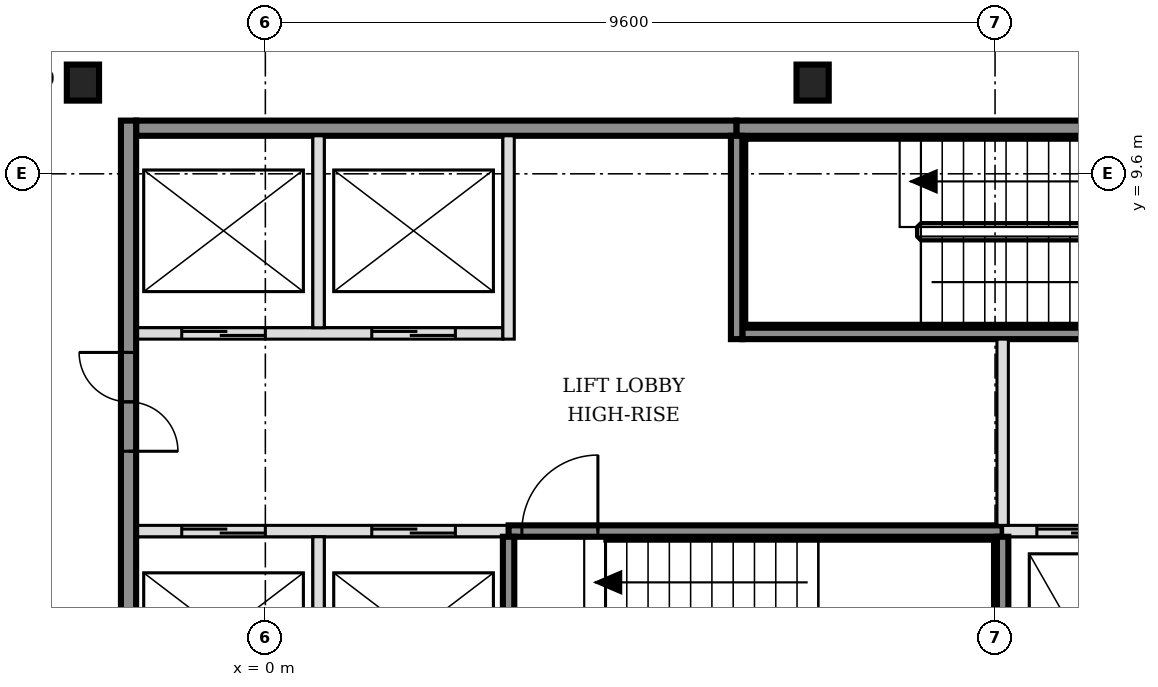
"""IFC4 building model, lengths in metres.
Left out: names, types, materials, properties, quantities, classifications, styles, units other than length and angle.
Written with IfcOpenShell. Run it as: python <this file> out.ifc"""

import sys

from ifc_helpers import new_model, si_unit, direction, frame, frame_2d, origin, origin_2d, place, context, subcontext, project, spatial, rectangle, i_section, extrude, element, fill, save


model = new_model("IFC4")
c1 = context("Model", 3, precision=1e-05, world=origin(), true_north=direction((0.0, 1.0)))
c2 = subcontext(c1, "Body", "Model", "MODEL_VIEW")
j1 = project(units=[si_unit("LENGTHUNIT", "METRE"), si_unit("PLANEANGLEUNIT", "RADIAN")], contexts=[c1])
p1 = place(None, origin())
s1 = spatial("IfcSite", under=j1, at=p1, CompositionType="ELEMENT")
p2 = place(p1, origin())
s2 = spatial("IfcBuilding", under=s1, at=p2, CompositionType="ELEMENT")
p3 = place(p2, frame((0.0, 0.0, 125.4)))
s3 = spatial("IfcBuildingStorey", under=s2, at=p3, CompositionType="ELEMENT", Elevation=125.4)
for number, where, z_axis, x_axis in (
    (1, (-2.4, 10.8, -0.15), (0.0, 0.0, 1.0), (1.0, 0.0, 0.0)),
    (2, (7.2, 10.8, -0.15), (0.0, 0.0, 1.0), (1.0, 0.0, 0.0)),
):
    element("IfcColumn", number, at=place(p3, frame(where, z_axis=z_axis, x_axis=x_axis)), inside=s3, PredefinedType="COLUMN", context=c2, shape_type="SweptSolid", body=[
        extrude(i_section(OverallWidth=0.424, OverallDepth=0.474, WebThickness=0.048, FlangeThickness=0.077, FilletRadius=0.015, at=origin_2d()), origin(), (0.0, 0.0, 1.0), 3.6),
    ])
p4 = place(p3, frame((-1.7, 4.9, 0.0), z_axis=(0.0, 0.0, 1.0), x_axis=(1.0, 0.0, 0.0)))
e3 = element("IfcWall", 3, at=p4, inside=s3, PredefinedType="SOLIDWALL", context=c2, shape_type="SweptSolid", body=[
    extrude(rectangle(XDim=4.9, YDim=0.15, at=frame_2d((2.45, 0.0))), origin(), (0.0, 0.0, 1.0), 3.45),
])
p5 = place(p4, frame((0.6, 0.0, 0.0)))
e4 = element("IfcOpeningElement", 4, at=p5, cuts=e3, PredefinedType="OPENING", context=c2, shape_type="SweptSolid", body=[
    extrude(rectangle(XDim=1.1, YDim=2.1, at=frame_2d((0.55, 1.05))), frame((0.0, 0.085, 0.0), z_axis=(0.0, -1.0, 0.0), x_axis=(1.0, 0.0, 0.0)), (0.0, 0.0, 1.0), 0.17),
])
p6 = place(p4, frame((3.1, 0.0, 0.0)))
e5 = element("IfcOpeningElement", 5, at=p6, cuts=e3, PredefinedType="OPENING", context=c2, shape_type="SweptSolid", body=[
    extrude(rectangle(XDim=1.1, YDim=2.1, at=frame_2d((0.55, 1.05))), frame((0.0, 0.085, 0.0), z_axis=(0.0, -1.0, 0.0), x_axis=(1.0, 0.0, 0.0)), (0.0, 0.0, 1.0), 0.17),
])
p7 = place(p3, frame((3.2, 4.9, 0.0), z_axis=(0.0, 0.0, 1.0), x_axis=(1.0, 0.0, 0.0)))
e6 = element("IfcWall", 6, at=p7, inside=s3, PredefinedType="SOLIDWALL", context=c2, shape_type="SweptSolid", body=[
    extrude(rectangle(XDim=6.5, YDim=0.15, at=frame_2d((3.25, 0.0))), origin(), (0.0, 0.0, 1.0), 3.45),
])
p8 = place(p7, frame((0.175, 0.0, 0.0)))
e7 = element("IfcOpeningElement", 7, at=p8, cuts=e6, PredefinedType="OPENING", context=c2, shape_type="SweptSolid", body=[
    extrude(rectangle(XDim=1.0, YDim=2.1, at=frame_2d((0.5, 1.05))), frame((0.0, 0.085, 0.0), z_axis=(0.0, -1.0, 0.0), x_axis=(1.0, 0.0, 0.0)), (0.0, 0.0, 1.0), 0.17),
])
p9 = place(p3, frame((9.7, 4.9, 0.0), z_axis=(0.0, 0.0, 1.0), x_axis=(1.0, 0.0, 0.0)))
e8 = element("IfcWall", 8, at=p9, inside=s3, PredefinedType="SOLIDWALL", context=c2, shape_type="SweptSolid", body=[
    extrude(rectangle(XDim=6.4, YDim=0.15, at=frame_2d((3.2, 0.0))), origin(), (0.0, 0.0, 1.0), 3.45),
])
p10 = place(p9, frame((0.45, 0.0, 0.0)))
e9 = element("IfcOpeningElement", 9, at=p10, cuts=e8, PredefinedType="OPENING", context=c2, shape_type="SweptSolid", body=[
    extrude(rectangle(XDim=1.0, YDim=2.1, at=frame_2d((0.5, 1.05))), frame((0.0, 0.085, 0.0), z_axis=(0.0, -1.0, 0.0), x_axis=(1.0, 0.0, 0.0)), (0.0, 0.0, 1.0), 0.17),
])
p11 = place(p9, frame((2.35, 0.0, 0.0)))
e10 = element("IfcOpeningElement", 10, at=p11, cuts=e8, PredefinedType="OPENING", context=c2, shape_type="SweptSolid", body=[
    extrude(rectangle(XDim=1.0, YDim=2.1, at=frame_2d((0.5, 1.05))), frame((0.0, 0.085, 0.0), z_axis=(0.0, -1.0, 0.0), x_axis=(1.0, 0.0, 0.0)), (0.0, 0.0, 1.0), 0.17),
])
p12 = place(p9, frame((4.7, 0.0, 0.0)))
e11 = element("IfcOpeningElement", 11, at=p12, cuts=e8, PredefinedType="OPENING", context=c2, shape_type="SweptSolid", body=[
    extrude(rectangle(XDim=0.9, YDim=2.1, at=frame_2d((0.45, 1.05))), frame((0.0, 0.085, 0.0), z_axis=(0.0, -1.0, 0.0), x_axis=(1.0, 0.0, 0.0)), (0.0, 0.0, 1.0), 0.17),
])
p13 = place(p3, frame((-1.7, 7.5, 0.0), z_axis=(0.0, 0.0, 1.0), x_axis=(1.0, 0.0, 0.0)))
e12 = element("IfcWall", 12, at=p13, inside=s3, PredefinedType="SOLIDWALL", context=c2, shape_type="SweptSolid", body=[
    extrude(rectangle(XDim=4.825, YDim=0.15, at=frame_2d((2.413, 0.0))), origin(), (0.0, 0.0, 1.0), 3.45),
])
p14 = place(p13, frame((0.6, 0.0, 0.0)))
e13 = element("IfcOpeningElement", 13, at=p14, cuts=e12, PredefinedType="OPENING", context=c2, shape_type="SweptSolid", body=[
    extrude(rectangle(XDim=1.1, YDim=2.1, at=frame_2d((0.55, 1.05))), frame((0.0, 0.085, 0.0), z_axis=(0.0, -1.0, 0.0), x_axis=(1.0, 0.0, 0.0)), (0.0, 0.0, 1.0), 0.17),
])
p15 = place(p13, frame((3.1, 0.0, 0.0)))
e14 = element("IfcOpeningElement", 14, at=p15, cuts=e12, PredefinedType="OPENING", context=c2, shape_type="SweptSolid", body=[
    extrude(rectangle(XDim=1.1, YDim=2.1, at=frame_2d((0.55, 1.05))), frame((0.0, 0.085, 0.0), z_axis=(0.0, -1.0, 0.0), x_axis=(1.0, 0.0, 0.0)), (0.0, 0.0, 1.0), 0.17),
])
p16 = place(p3, frame((6.275, 7.5, 0.0), z_axis=(0.0, 0.0, 1.0), x_axis=(1.0, 0.0, 0.0)))
e15 = element("IfcWall", 15, at=p16, inside=s3, PredefinedType="SOLIDWALL", context=c2, shape_type="SweptSolid", body=[
    extrude(rectangle(XDim=6.425, YDim=0.15, at=frame_2d((3.212, 0.0))), origin(), (0.0, 0.0, 1.0), 3.45),
])
p17 = place(p16, frame((5.225, 0.0, 0.0)))
e16 = element("IfcOpeningElement", 16, at=p17, cuts=e15, PredefinedType="OPENING", context=c2, shape_type="SweptSolid", body=[
    extrude(rectangle(XDim=1.0, YDim=2.1, at=frame_2d((0.5, 1.05))), frame((0.0, 0.085, 0.0), z_axis=(0.0, -1.0, 0.0), x_axis=(1.0, 0.0, 0.0)), (0.0, 0.0, 1.0), 0.17),
])
p18 = place(p3, frame((-1.7, 10.2, 0.0), z_axis=(0.0, 0.0, 1.0), x_axis=(1.0, 0.0, 0.0)))
e17 = element("IfcWall", 17, at=p18, inside=s3, PredefinedType="SOLIDWALL", context=c2, shape_type="SweptSolid", body=[
    extrude(rectangle(XDim=7.9, YDim=0.2, at=frame_2d((3.95, 0.0))), origin(), (0.0, 0.0, 1.0), 3.45),
])
p19 = place(p3, frame((6.2, 10.2, 0.0), z_axis=(0.0, 0.0, 1.0), x_axis=(1.0, 0.0, 0.0)))
e18 = element("IfcWall", 18, at=p19, inside=s3, PredefinedType="SOLIDWALL", context=c2, shape_type="SweptSolid", body=[
    extrude(rectangle(XDim=6.5, YDim=0.2, at=frame_2d((3.25, 0.0))), origin(), (0.0, 0.0, 1.0), 3.45),
])
p20 = place(p3, frame((-1.8, -5.5, 0.0), z_axis=(0.0, 0.0, 1.0), x_axis=(0.0, 1.0, 0.0)))
e19 = element("IfcWall", 19, at=p20, inside=s3, PredefinedType="SOLIDWALL", context=c2, shape_type="SweptSolid", body=[
    extrude(rectangle(XDim=15.8, YDim=0.2, at=frame_2d((7.9, 0.0))), origin(), (0.0, 0.0, 1.0), 3.45),
])
p21 = place(p20, frame((3.05, 0.0, 0.0)))
e20 = element("IfcOpeningElement", 20, at=p21, cuts=e19, PredefinedType="OPENING", context=c2, shape_type="SweptSolid", body=[
    extrude(rectangle(XDim=1.3, YDim=2.1, at=frame_2d((0.65, 1.05))), frame((0.0, 0.11, 0.0), z_axis=(0.0, -1.0, 0.0), x_axis=(1.0, 0.0, 0.0)), (0.0, 0.0, 1.0), 0.22),
])
p22 = place(p20, frame((11.45, 0.0, 0.0)))
e21 = element("IfcOpeningElement", 21, at=p22, cuts=e19, PredefinedType="OPENING", context=c2, shape_type="SweptSolid", body=[
    extrude(rectangle(XDim=1.3, YDim=2.1, at=frame_2d((0.65, 1.05))), frame((0.0, 0.11, 0.0), z_axis=(0.0, -1.0, 0.0), x_axis=(1.0, 0.0, 0.0)), (0.0, 0.0, 1.0), 0.22),
])
p23 = place(p3, frame((0.7, 2.275, 0.0), z_axis=(0.0, 0.0, 1.0), x_axis=(0.0, 1.0, 0.0)))
e22 = element("IfcWall", 22, at=p23, inside=s3, PredefinedType="SOLIDWALL", context=c2, shape_type="SweptSolid", body=[
    extrude(rectangle(XDim=2.55, YDim=0.15, at=frame_2d((1.275, 0.0))), origin(), (0.0, 0.0, 1.0), 3.45),
])
p24 = place(p3, frame((0.7, 7.575, 0.0), z_axis=(0.0, 0.0, 1.0), x_axis=(0.0, 1.0, 0.0)))
e23 = element("IfcWall", 23, at=p24, inside=s3, PredefinedType="SOLIDWALL", context=c2, shape_type="SweptSolid", body=[
    extrude(rectangle(XDim=2.525, YDim=0.15, at=frame_2d((1.263, 0.0))), origin(), (0.0, 0.0, 1.0), 3.45),
])
p25 = place(p3, frame((3.2, 2.275, 0.0), z_axis=(0.0, 0.0, 1.0), x_axis=(0.0, 1.0, 0.0)))
e24 = element("IfcWall", 24, at=p25, inside=s3, PredefinedType="SOLIDWALL", context=c2, shape_type="SweptSolid", body=[
    extrude(rectangle(XDim=2.55, YDim=0.15, at=frame_2d((1.275, 0.0))), origin(), (0.0, 0.0, 1.0), 3.45),
])
for number, where, z_axis, x_axis in (
    (25, (3.2, 7.425, 0.0), (0.0, 0.0, 1.0), (0.0, 1.0, 0.0)),
    (26, (6.2, 7.425, 0.0), (0.0, 0.0, 1.0), (0.0, 1.0, 0.0)),
):
    element("IfcWall", number, at=place(p3, frame(where, z_axis=z_axis, x_axis=x_axis)), inside=s3, PredefinedType="SOLIDWALL", context=c2, shape_type="SweptSolid", body=[
        extrude(rectangle(XDim=2.675, YDim=0.15, at=frame_2d((1.337, 0.0))), origin(), (0.0, 0.0, 1.0), 3.45),
    ])
p26 = place(p3, frame((9.7, 2.275, 0.0), z_axis=(0.0, 0.0, 1.0), x_axis=(0.0, 1.0, 0.0)))
e27 = element("IfcWall", 27, at=p26, inside=s3, PredefinedType="SOLIDWALL", context=c2, shape_type="SweptSolid", body=[
    extrude(rectangle(XDim=2.55, YDim=0.15, at=frame_2d((1.275, 0.0))), origin(), (0.0, 0.0, 1.0), 3.45),
])
p27 = place(p3, frame((9.7, 4.975, 0.0), z_axis=(0.0, 0.0, 1.0), x_axis=(0.0, 1.0, 0.0)))
e28 = element("IfcWall", 28, at=p27, inside=s3, PredefinedType="SOLIDWALL", context=c2, shape_type="SweptSolid", body=[
    extrude(rectangle(XDim=2.45, YDim=0.15, at=frame_2d((1.225, 0.0))), origin(), (0.0, 0.0, 1.0), 3.45),
])
p28 = place(p3, frame((-13.275, 8.119, 0.0), z_axis=(0.0, 0.0, 1.0), x_axis=(0.707099678619, 0.707113883683, 0.0)))
e29 = element("IfcWall", 29, at=p28, inside=s3, PredefinedType="PARTITIONING", context=c2, shape_type="SweptSolid", body=[
    extrude(rectangle(XDim=17.187, YDim=0.15, at=frame_2d((8.593, 0.0))), origin(), (0.0, 0.0, 1.0), 2.73),
])
p29 = place(p28, frame((9.073, 0.0, 0.0)))
e30 = element("IfcOpeningElement", 30, at=p29, cuts=e29, PredefinedType="OPENING", context=c2, shape_type="SweptSolid", body=[
    extrude(rectangle(XDim=0.9, YDim=2.1, at=frame_2d((0.45, 1.05))), frame((0.0, 0.085, 0.0), z_axis=(0.0, -1.0, 0.0), x_axis=(1.0, 0.0, 0.0)), (0.0, 0.0, 1.0), 0.17),
])
p30 = place(p28, frame((5.317, 0.0, 0.0)))
e31 = element("IfcOpeningElement", 31, at=p30, cuts=e29, PredefinedType="OPENING", context=c2, shape_type="SweptSolid", body=[
    extrude(rectangle(XDim=0.9, YDim=2.1, at=frame_2d((0.45, 1.05))), frame((0.0, 0.085, 0.0), z_axis=(0.0, -1.0, 0.0), x_axis=(1.0, 0.0, 0.0)), (0.0, 0.0, 1.0), 0.17),
])
p31 = place(p5, origin())
e32 = element("IfcDoor", 32, at=p31, inside=s3, OperationType="DOUBLE_DOOR_SLIDING", PredefinedType="DOOR", context=c2, shape_type="SweptSolid", body=[
    extrude(rectangle(XDim=1.1, YDim=2.1, at=frame_2d((0.55, 1.05))), frame((0.0, 0.025, 0.0), z_axis=(0.0, -1.0, 0.0), x_axis=(1.0, 0.0, 0.0)), (0.0, 0.0, 1.0), 0.05),
])
fill(e4, e32)
p32 = place(p6, origin())
e33 = element("IfcDoor", 33, at=p32, inside=s3, OperationType="DOUBLE_DOOR_SLIDING", PredefinedType="DOOR", context=c2, shape_type="SweptSolid", body=[
    extrude(rectangle(XDim=1.1, YDim=2.1, at=frame_2d((0.55, 1.05))), frame((0.0, 0.025, 0.0), z_axis=(0.0, -1.0, 0.0), x_axis=(1.0, 0.0, 0.0)), (0.0, 0.0, 1.0), 0.05),
])
fill(e5, e33)
p33 = place(p14, origin())
e34 = element("IfcDoor", 34, at=p33, inside=s3, OperationType="DOUBLE_DOOR_SLIDING", PredefinedType="DOOR", context=c2, shape_type="SweptSolid", body=[
    extrude(rectangle(XDim=1.1, YDim=2.1, at=frame_2d((0.55, 1.05))), frame((0.0, 0.025, 0.0), z_axis=(0.0, -1.0, 0.0), x_axis=(1.0, 0.0, 0.0)), (0.0, 0.0, 1.0), 0.05),
])
fill(e13, e34)
p34 = place(p15, origin())
e35 = element("IfcDoor", 35, at=p34, inside=s3, OperationType="DOUBLE_DOOR_SLIDING", PredefinedType="DOOR", context=c2, shape_type="SweptSolid", body=[
    extrude(rectangle(XDim=1.1, YDim=2.1, at=frame_2d((0.55, 1.05))), frame((0.0, 0.025, 0.0), z_axis=(0.0, -1.0, 0.0), x_axis=(1.0, 0.0, 0.0)), (0.0, 0.0, 1.0), 0.05),
])
fill(e14, e35)
p35 = place(p10, origin())
e36 = element("IfcDoor", 36, at=p35, inside=s3, OperationType="DOUBLE_DOOR_SLIDING", PredefinedType="DOOR", context=c2, shape_type="SweptSolid", body=[
    extrude(rectangle(XDim=1.0, YDim=2.1, at=frame_2d((0.5, 1.05))), frame((0.0, 0.025, 0.0), z_axis=(0.0, -1.0, 0.0), x_axis=(1.0, 0.0, 0.0)), (0.0, 0.0, 1.0), 0.05),
])
fill(e9, e36)
p36 = place(p8, origin())
e37 = element("IfcDoor", 37, at=p36, inside=s3, OperationType="SINGLE_SWING_RIGHT", PredefinedType="DOOR", context=c2, shape_type="SweptSolid", body=[
    extrude(rectangle(XDim=1.0, YDim=2.1, at=frame_2d((0.5, 1.05))), frame((0.0, 0.025, 0.0), z_axis=(0.0, -1.0, 0.0), x_axis=(1.0, 0.0, 0.0)), (0.0, 0.0, 1.0), 0.05),
])
fill(e7, e37)
p37 = place(p22, origin())
e38 = element("IfcDoor", 38, at=p37, inside=s3, OperationType="DOUBLE_DOOR_SINGLE_SWING", PredefinedType="DOOR", context=c2, shape_type="SweptSolid", body=[
    extrude(rectangle(XDim=1.3, YDim=2.1, at=frame_2d((0.65, 1.05))), frame((0.0, 0.025, 0.0), z_axis=(0.0, -1.0, 0.0), x_axis=(1.0, 0.0, 0.0)), (0.0, 0.0, 1.0), 0.05),
])
fill(e21, e38)
save(model, sys.argv[1])
